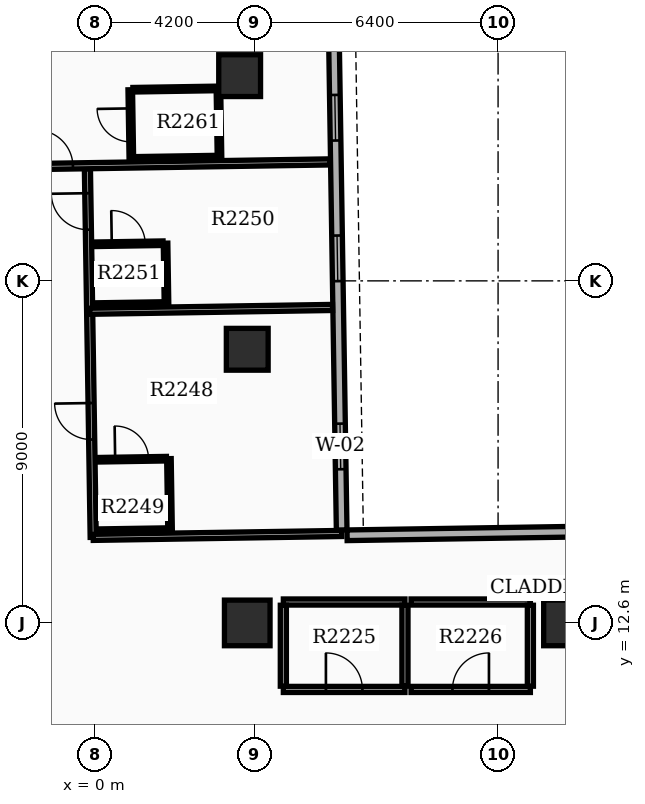
"""IFC4 building model, lengths in metres.
Left out: names, types, materials, properties, quantities, classifications, styles, units other than length and angle.
Written with IfcOpenShell. Run it as: python <this file> out.ifc"""

import sys

from ifc_helpers import new_model, si_unit, direction, frame, frame_2d, origin, origin_2d, place, context, subcontext, project, spatial, rectangle, extrude, element, fill, save


model = new_model("IFC4")
c1 = context("Model", 3, precision=1e-05, world=origin(), true_north=direction((0.0, 1.0)))
c2 = subcontext(c1, "Body", "Model", "MODEL_VIEW")
j1 = project(units=[si_unit("LENGTHUNIT", "METRE"), si_unit("PLANEANGLEUNIT", "RADIAN")], contexts=[c1])
p1 = place(None, origin())
s1 = spatial("IfcSite", under=j1, at=p1, CompositionType="ELEMENT")
p2 = place(p1, origin())
s2 = spatial("IfcBuilding", under=s1, at=p2, CompositionType="ELEMENT")
p3 = place(p2, frame((0.0, 0.0, 139.8)))
s3 = spatial("IfcBuildingStorey", under=s2, at=p3, CompositionType="ELEMENT", Elevation=139.8)
for number, where, z_axis, x_axis in (
    (1, (12.4, 12.6, 0.0), (0.0, 0.0, 1.0), (1.0, 0.0, 0.0)),
    (2, (4.0, 12.6, 0.0), (0.0, 0.0, 1.0), (1.0, 0.0, 0.0)),
):
    element("IfcColumn", number, at=place(p3, frame(where, z_axis=z_axis, x_axis=x_axis)), inside=s3, PredefinedType="COLUMN", context=c2, shape_type="SweptSolid", body=[
        extrude(rectangle(XDim=1.2, YDim=1.2, at=origin_2d()), origin(), (0.0, 0.0, 1.0), 3.9),
    ])
for number, where, z_axis, x_axis in (
    (3, (4.0, 19.8, 0.0), (0.0, 0.0, 1.0), (1.0, 0.0, 0.0)),
    (4, (3.8, 27.0, 0.0), (0.0, 0.0, 1.0), (1.0, 0.0, 0.0)),
):
    element("IfcColumn", number, at=place(p3, frame(where, z_axis=z_axis, x_axis=x_axis)), inside=s3, PredefinedType="COLUMN", context=c2, shape_type="SweptSolid", body=[
        extrude(rectangle(XDim=1.1, YDim=1.1, at=origin_2d()), origin(), (0.0, 0.0, 1.0), 3.9),
    ])
p4 = place(p3, frame((6.485, 15.044, 0.0), z_axis=(0.0, 0.0, 1.0), x_axis=(-0.01571739401, 0.999876474133, 0.0)))
e5 = element("IfcWall", 5, at=p4, inside=s3, PredefinedType="STANDARD", context=c2, shape_type="SweptSolid", body=[
    extrude(rectangle(XDim=20.1, YDim=0.28, at=frame_2d((10.05, 0.0))), origin(), (0.0, 0.0, 1.0), 2.92),
])
p5 = place(p4, frame((1.6, 0.0, 0.8)))
e6 = element("IfcOpeningElement", 6, at=p5, cuts=e5, PredefinedType="OPENING", context=c2, shape_type="SweptSolid", body=[
    extrude(rectangle(XDim=1.2, YDim=1.6, at=frame_2d((0.6, 0.8))), frame((0.0, 0.15, 0.0), z_axis=(0.0, -1.0, 0.0), x_axis=(1.0, 0.0, 0.0)), (0.0, 0.0, 1.0), 0.3),
])
p6 = place(p4, frame((6.55, 0.0, 0.8)))
e7 = element("IfcOpeningElement", 7, at=p6, cuts=e5, PredefinedType="OPENING", context=c2, shape_type="SweptSolid", body=[
    extrude(rectangle(XDim=1.2, YDim=1.6, at=frame_2d((0.6, 0.8))), frame((0.0, 0.15, 0.0), z_axis=(0.0, -1.0, 0.0), x_axis=(1.0, 0.0, 0.0)), (0.0, 0.0, 1.0), 0.3),
])
p7 = place(p4, frame((10.25, 0.0, 0.8)))
e8 = element("IfcOpeningElement", 8, at=p7, cuts=e5, PredefinedType="OPENING", context=c2, shape_type="SweptSolid", body=[
    extrude(rectangle(XDim=1.2, YDim=1.6, at=frame_2d((0.6, 0.8))), frame((0.0, 0.15, 0.0), z_axis=(0.0, -1.0, 0.0), x_axis=(1.0, 0.0, 0.0)), (0.0, 0.0, 1.0), 0.3),
])
p8 = place(p4, frame((13.45, 0.0, 0.8)))
e9 = element("IfcOpeningElement", 9, at=p8, cuts=e5, PredefinedType="OPENING", context=c2, shape_type="SweptSolid", body=[
    extrude(rectangle(XDim=1.2, YDim=1.6, at=frame_2d((0.6, 0.8))), frame((0.0, 0.15, 0.0), z_axis=(0.0, -1.0, 0.0), x_axis=(1.0, 0.0, 0.0)), (0.0, 0.0, 1.0), 0.3),
])
p9 = place(p3, frame((12.926, 15.005, 0.0), z_axis=(0.0, 0.0, 1.0), x_axis=(-0.999876823822, -0.015695132501, 0.0)))
e10 = element("IfcWall", 10, at=p9, inside=s3, PredefinedType="STANDARD", context=c2, shape_type="SweptSolid", body=[
    extrude(rectangle(XDim=6.3, YDim=0.28, at=frame_2d((3.15, 0.0))), origin(), (0.0, 0.0, 1.0), 2.92),
])
p10 = place(p3, frame((4.95, 10.85, 0.0), z_axis=(0.0, 0.0, 1.0), x_axis=(1.0, 0.0, 0.0)))
e11 = element("IfcWall", 11, at=p10, inside=s3, PredefinedType="PARTITIONING", context=c2, shape_type="SweptSolid", body=[
    extrude(rectangle(XDim=3.2, YDim=0.16, at=frame_2d((1.6, 0.0))), origin(), (0.0, 0.0, 1.0), 2.91),
])
p11 = place(p10, frame((1.12, 0.0, 0.0)))
e12 = element("IfcOpeningElement", 12, at=p11, cuts=e11, PredefinedType="OPENING", context=c2, shape_type="SweptSolid", body=[
    extrude(rectangle(XDim=0.96, YDim=2.15, at=frame_2d((0.48, 1.075))), frame((0.0, 0.09, 0.0), z_axis=(0.0, -1.0, 0.0), x_axis=(1.0, 0.0, 0.0)), (0.0, 0.0, 1.0), 0.18),
])
p12 = place(p3, frame((4.95, 13.15, 0.0), z_axis=(0.0, 0.0, 1.0), x_axis=(1.0, 0.0, 0.0)))
e13 = element("IfcWall", 13, at=p12, inside=s3, PredefinedType="PARTITIONING", context=c2, shape_type="SweptSolid", body=[
    extrude(rectangle(XDim=3.2, YDim=0.16, at=frame_2d((1.6, 0.0))), origin(), (0.0, 0.0, 1.0), 2.91),
])
for number, where, z_axis, x_axis in (
    (14, (4.95, 10.935, 0.0), (0.0, 0.0, 1.0), (0.0, 1.0, 0.0)),
    (15, (8.15, 10.935, 0.0), (0.0, 0.0, 1.0), (0.0, 1.0, 0.0)),
):
    element("IfcWall", number, at=place(p3, frame(where, z_axis=z_axis, x_axis=x_axis)), inside=s3, PredefinedType="PARTITIONING", context=c2, shape_type="SweptSolid", body=[
        extrude(rectangle(XDim=2.13, YDim=0.16, at=frame_2d((1.065, 0.0))), origin(), (0.0, 0.0, 1.0), 2.91),
    ])
p13 = place(p3, frame((8.31, 10.85, 0.0), z_axis=(0.0, 0.0, 1.0), x_axis=(1.0, 0.0, 0.0)))
e16 = element("IfcWall", 16, at=p13, inside=s3, PredefinedType="PARTITIONING", context=c2, shape_type="SweptSolid", body=[
    extrude(rectangle(XDim=3.14, YDim=0.16, at=frame_2d((1.57, 0.0))), origin(), (0.0, 0.0, 1.0), 2.91),
])
p14 = place(p13, frame((1.09, 0.0, 0.0)))
e17 = element("IfcOpeningElement", 17, at=p14, cuts=e16, PredefinedType="OPENING", context=c2, shape_type="SweptSolid", body=[
    extrude(rectangle(XDim=0.96, YDim=2.15, at=frame_2d((0.48, 1.075))), frame((0.0, 0.09, 0.0), z_axis=(0.0, -1.0, 0.0), x_axis=(1.0, 0.0, 0.0)), (0.0, 0.0, 1.0), 0.18),
])
p15 = place(p3, frame((8.31, 13.15, 0.0), z_axis=(0.0, 0.0, 1.0), x_axis=(1.0, 0.0, 0.0)))
e18 = element("IfcWall", 18, at=p15, inside=s3, PredefinedType="PARTITIONING", context=c2, shape_type="SweptSolid", body=[
    extrude(rectangle(XDim=3.14, YDim=0.16, at=frame_2d((1.57, 0.0))), origin(), (0.0, 0.0, 1.0), 2.91),
])
p16 = place(p3, frame((11.45, 10.935, 0.0), z_axis=(0.0, 0.0, 1.0), x_axis=(0.0, 1.0, 0.0)))
e19 = element("IfcWall", 19, at=p16, inside=s3, PredefinedType="PARTITIONING", context=c2, shape_type="SweptSolid", body=[
    extrude(rectangle(XDim=2.13, YDim=0.16, at=frame_2d((1.065, 0.0))), origin(), (0.0, 0.0, 1.0), 2.91),
])
p17 = place(p3, frame((-0.053, 14.851, 0.0), z_axis=(0.0, 0.0, 1.0), x_axis=(-0.015705659641, 0.999876658521, 0.0)))
e20 = element("IfcWall", 20, at=p17, inside=s3, PredefinedType="PARTITIONING", context=c2, shape_type="SweptSolid", body=[
    extrude(rectangle(XDim=9.7, YDim=0.16, at=frame_2d((4.85, 0.0))), origin(), (0.0, 0.0, 1.0), 2.91),
])
p18 = place(p17, frame((2.575, 0.0, 0.0)))
e21 = element("IfcOpeningElement", 21, at=p18, cuts=e20, PredefinedType="OPENING", context=c2, shape_type="SweptSolid", body=[
    extrude(rectangle(XDim=0.96, YDim=2.15, at=frame_2d((0.48, 1.075))), frame((0.0, 0.09, 0.0), z_axis=(0.0, -1.0, 0.0), x_axis=(1.0, 0.0, 0.0)), (0.0, 0.0, 1.0), 0.18),
])
p19 = place(p17, frame((8.097, 0.0, 0.0)))
e22 = element("IfcOpeningElement", 22, at=p19, cuts=e20, PredefinedType="OPENING", context=c2, shape_type="SweptSolid", body=[
    extrude(rectangle(XDim=0.96, YDim=2.15, at=frame_2d((0.48, 1.075))), frame((0.0, 0.09, 0.0), z_axis=(0.0, -1.0, 0.0), x_axis=(1.0, 0.0, 0.0)), (0.0, 0.0, 1.0), 0.18),
])
p20 = place(p3, frame((-0.053, 14.851, 0.0), z_axis=(0.0, 0.0, 1.0), x_axis=(0.999877075733, 0.015679076008, 0.0)))
e23 = element("IfcWall", 23, at=p20, inside=s3, PredefinedType="PARTITIONING", context=c2, shape_type="SweptSolid", body=[
    extrude(rectangle(XDim=6.54, YDim=0.16, at=frame_2d((3.27, 0.0))), origin(), (0.0, 0.0, 1.0), 2.91),
])
p21 = place(p3, frame((-0.147, 20.8, 0.0), z_axis=(0.0, 0.0, 1.0), x_axis=(0.999876774542, 0.015698271615, 0.0)))
e24 = element("IfcWall", 24, at=p21, inside=s3, PredefinedType="PARTITIONING", context=c2, shape_type="SweptSolid", body=[
    extrude(rectangle(XDim=6.392, YDim=0.16, at=frame_2d((3.196, 0.0))), origin(), (0.0, 0.0, 1.0), 2.91),
])
p22 = place(p3, frame((0.055, 16.893, 0.0), z_axis=(0.0, 0.0, 1.0), x_axis=(0.999876836305, 0.015694337248, 0.0)))
e25 = element("IfcWall", 25, at=p22, inside=s3, PredefinedType="PARTITIONING", context=c2, shape_type="SweptSolid", body=[
    extrude(rectangle(XDim=1.82, YDim=0.12, at=frame_2d((0.91, 0.0))), origin(), (0.0, 0.0, 1.0), 2.91),
])
p23 = place(p22, frame((0.47, 0.0, 0.0)))
e26 = element("IfcOpeningElement", 26, at=p23, cuts=e25, PredefinedType="OPENING", context=c2, shape_type="SweptSolid", body=[
    extrude(rectangle(XDim=0.88, YDim=2.1, at=frame_2d((0.44, 1.05))), frame((0.0, 0.07, 0.0), z_axis=(0.0, -1.0, 0.0), x_axis=(1.0, 0.0, 0.0)), (0.0, 0.0, 1.0), 0.14),
])
p24 = place(p3, frame((0.084, 15.013, 0.0), z_axis=(0.0, 0.0, 1.0), x_axis=(0.999876836305, 0.015694337248, 0.0)))
e27 = element("IfcWall", 27, at=p24, inside=s3, PredefinedType="PARTITIONING", context=c2, shape_type="SweptSolid", body=[
    extrude(rectangle(XDim=1.82, YDim=0.12, at=frame_2d((0.91, 0.0))), origin(), (0.0, 0.0, 1.0), 2.91),
])
p25 = place(p3, frame((1.969, 15.043, 0.0), z_axis=(0.0, 0.0, 1.0), x_axis=(-0.01571234584, 0.999876553475, 0.0)))
e28 = element("IfcWall", 28, at=p25, inside=s3, PredefinedType="PARTITIONING", context=c2, shape_type="SweptSolid", body=[
    extrude(rectangle(XDim=1.88, YDim=0.12, at=frame_2d((0.94, 0.0))), origin(), (0.0, 0.0, 1.0), 2.91),
])
p26 = place(p3, frame((-0.034, 22.562, 0.0), z_axis=(0.0, 0.0, 1.0), x_axis=(0.999876836305, 0.015694337248, 0.0)))
e29 = element("IfcWall", 29, at=p26, inside=s3, PredefinedType="PARTITIONING", context=c2, shape_type="SweptSolid", body=[
    extrude(rectangle(XDim=1.82, YDim=0.12, at=frame_2d((0.91, 0.0))), origin(), (0.0, 0.0, 1.0), 2.91),
])
p27 = place(p26, frame((0.47, 0.0, 0.0)))
e30 = element("IfcOpeningElement", 30, at=p27, cuts=e29, PredefinedType="OPENING", context=c2, shape_type="SweptSolid", body=[
    extrude(rectangle(XDim=0.88, YDim=2.1, at=frame_2d((0.44, 1.05))), frame((0.0, 0.07, 0.0), z_axis=(0.0, -1.0, 0.0), x_axis=(1.0, 0.0, 0.0)), (0.0, 0.0, 1.0), 0.14),
])
p28 = place(p3, frame((-0.009, 20.962, 0.0), z_axis=(0.0, 0.0, 1.0), x_axis=(0.999876836305, 0.015694337248, 0.0)))
e31 = element("IfcWall", 31, at=p28, inside=s3, PredefinedType="PARTITIONING", context=c2, shape_type="SweptSolid", body=[
    extrude(rectangle(XDim=1.82, YDim=0.12, at=frame_2d((0.91, 0.0))), origin(), (0.0, 0.0, 1.0), 2.91),
])
p29 = place(p3, frame((1.875, 20.992, 0.0), z_axis=(0.0, 0.0, 1.0), x_axis=(-0.015716050513, 0.999876495251, 0.0)))
e32 = element("IfcWall", 32, at=p29, inside=s3, PredefinedType="PARTITIONING", context=c2, shape_type="SweptSolid", body=[
    extrude(rectangle(XDim=1.6, YDim=0.12, at=frame_2d((0.8, 0.0))), origin(), (0.0, 0.0, 1.0), 2.91),
])
p30 = place(p3, frame((-6.958, 24.524, 0.0), z_axis=(0.0, 0.0, 1.0), x_axis=(0.999876528878, 0.015713911007, 0.0)))
e33 = element("IfcWall", 33, at=p30, inside=s3, PredefinedType="PARTITIONING", context=c2, shape_type="SweptSolid", body=[
    extrude(rectangle(XDim=13.144, YDim=0.16, at=frame_2d((6.572, 0.0))), origin(), (0.0, 0.0, 1.0), 2.91),
])
p31 = place(p30, frame((5.412, 0.0, 0.0)))
e34 = element("IfcOpeningElement", 34, at=p31, cuts=e33, PredefinedType="OPENING", context=c2, shape_type="SweptSolid", body=[
    extrude(rectangle(XDim=0.96, YDim=2.15, at=frame_2d((0.48, 1.075))), frame((0.0, 0.09, 0.0), z_axis=(0.0, -1.0, 0.0), x_axis=(1.0, 0.0, 0.0)), (0.0, 0.0, 1.0), 0.18),
])
p32 = place(p3, frame((0.95, 24.808, 0.0), z_axis=(0.0, 0.0, 1.0), x_axis=(-0.015696442504, 0.999876803258, 0.0)))
e35 = element("IfcWall", 35, at=p32, inside=s3, PredefinedType="PARTITIONING", context=c2, shape_type="SweptSolid", body=[
    extrude(rectangle(XDim=1.82, YDim=0.12, at=frame_2d((0.91, 0.0))), origin(), (0.0, 0.0, 1.0), 2.91),
])
p33 = place(p32, frame((0.45, 0.0, 0.0)))
e36 = element("IfcOpeningElement", 36, at=p33, cuts=e35, PredefinedType="OPENING", context=c2, shape_type="SweptSolid", body=[
    extrude(rectangle(XDim=0.88, YDim=2.1, at=frame_2d((0.44, 1.05))), frame((0.0, 0.07, 0.0), z_axis=(0.0, -1.0, 0.0), x_axis=(1.0, 0.0, 0.0)), (0.0, 0.0, 1.0), 0.14),
])
p34 = place(p3, frame((3.27, 24.844, 0.0), z_axis=(0.0, 0.0, 1.0), x_axis=(-0.015694337248, 0.999876836305, 0.0)))
e37 = element("IfcWall", 37, at=p34, inside=s3, PredefinedType="PARTITIONING", context=c2, shape_type="SweptSolid", body=[
    extrude(rectangle(XDim=1.82, YDim=0.12, at=frame_2d((0.91, 0.0))), origin(), (0.0, 0.0, 1.0), 2.91),
])
for number, where, z_axis, x_axis in (
    (38, (1.021, 24.809, 0.0), (0.0, 0.0, 1.0), (1.0, 0.016, 0.0)),
    (39, (0.992, 26.629, 0.0), (0.0, 0.0, 1.0), (1.0, 0.016, 0.0)),
):
    element("IfcWall", number, at=place(p3, frame(where, z_axis=z_axis, x_axis=x_axis)), inside=s3, PredefinedType="PARTITIONING", context=c2, shape_type="SweptSolid", body=[
        extrude(rectangle(XDim=2.18, YDim=0.12, at=frame_2d((1.09, 0.0))), origin(), (0.0, 0.0, 1.0), 2.91),
    ])
p35 = place(p5, origin())
e40 = element("IfcWindow", 40, at=p35, inside=s3, PartitioningType="SINGLE_PANEL", PredefinedType="WINDOW", context=c2, shape_type="SweptSolid", body=[
    extrude(rectangle(XDim=1.2, YDim=1.6, at=frame_2d((0.6, 0.8))), frame((0.0, 0.03, 0.0), z_axis=(0.0, -1.0, 0.0), x_axis=(1.0, 0.0, 0.0)), (0.0, 0.0, 1.0), 0.06),
])
fill(e6, e40)
p36 = place(p6, origin())
e41 = element("IfcWindow", 41, at=p36, inside=s3, PartitioningType="SINGLE_PANEL", PredefinedType="WINDOW", context=c2, shape_type="SweptSolid", body=[
    extrude(rectangle(XDim=1.2, YDim=1.6, at=frame_2d((0.6, 0.8))), frame((0.0, 0.03, 0.0), z_axis=(0.0, -1.0, 0.0), x_axis=(1.0, 0.0, 0.0)), (0.0, 0.0, 1.0), 0.06),
])
fill(e7, e41)
p37 = place(p7, origin())
e42 = element("IfcWindow", 42, at=p37, inside=s3, PartitioningType="SINGLE_PANEL", PredefinedType="WINDOW", context=c2, shape_type="SweptSolid", body=[
    extrude(rectangle(XDim=1.2, YDim=1.6, at=frame_2d((0.6, 0.8))), frame((0.0, 0.03, 0.0), z_axis=(0.0, -1.0, 0.0), x_axis=(1.0, 0.0, 0.0)), (0.0, 0.0, 1.0), 0.06),
])
fill(e8, e42)
p38 = place(p11, origin())
e43 = element("IfcDoor", 43, at=p38, inside=s3, OperationType="SINGLE_SWING_LEFT", PredefinedType="DOOR", context=c2, shape_type="SweptSolid", body=[
    extrude(rectangle(XDim=0.96, YDim=2.15, at=frame_2d((0.48, 1.075))), frame((0.0, 0.025, 0.0), z_axis=(0.0, -1.0, 0.0), x_axis=(1.0, 0.0, 0.0)), (0.0, 0.0, 1.0), 0.05),
])
fill(e12, e43)
p39 = place(p14, origin())
e44 = element("IfcDoor", 44, at=p39, inside=s3, OperationType="SINGLE_SWING_RIGHT", PredefinedType="DOOR", context=c2, shape_type="SweptSolid", body=[
    extrude(rectangle(XDim=0.96, YDim=2.15, at=frame_2d((0.48, 1.075))), frame((0.0, 0.025, 0.0), z_axis=(0.0, -1.0, 0.0), x_axis=(1.0, 0.0, 0.0)), (0.0, 0.0, 1.0), 0.05),
])
fill(e17, e44)
p40 = place(p18, origin())
e45 = element("IfcDoor", 45, at=p40, inside=s3, OperationType="SINGLE_SWING_RIGHT", PredefinedType="DOOR", context=c2, shape_type="SweptSolid", body=[
    extrude(rectangle(XDim=0.96, YDim=2.15, at=frame_2d((0.48, 1.075))), frame((0.0, 0.025, 0.0), z_axis=(0.0, -1.0, 0.0), x_axis=(1.0, 0.0, 0.0)), (0.0, 0.0, 1.0), 0.05),
])
fill(e21, e45)
p41 = place(p23, origin())
e46 = element("IfcDoor", 46, at=p41, inside=s3, OperationType="SINGLE_SWING_LEFT", PredefinedType="DOOR", context=c2, shape_type="SweptSolid", body=[
    extrude(rectangle(XDim=0.88, YDim=2.1, at=frame_2d((0.44, 1.05))), frame((0.0, 0.025, 0.0), z_axis=(0.0, -1.0, 0.0), x_axis=(1.0, 0.0, 0.0)), (0.0, 0.0, 1.0), 0.05),
])
fill(e26, e46)
p42 = place(p19, origin())
e47 = element("IfcDoor", 47, at=p42, inside=s3, OperationType="SINGLE_SWING_RIGHT", PredefinedType="DOOR", context=c2, shape_type="SweptSolid", body=[
    extrude(rectangle(XDim=0.96, YDim=2.15, at=frame_2d((0.48, 1.075))), frame((0.0, 0.025, 0.0), z_axis=(0.0, -1.0, 0.0), x_axis=(1.0, 0.0, 0.0)), (0.0, 0.0, 1.0), 0.05),
])
fill(e22, e47)
p43 = place(p27, origin())
e48 = element("IfcDoor", 48, at=p43, inside=s3, OperationType="SINGLE_SWING_LEFT", PredefinedType="DOOR", context=c2, shape_type="SweptSolid", body=[
    extrude(rectangle(XDim=0.88, YDim=2.1, at=frame_2d((0.44, 1.05))), frame((0.0, 0.025, 0.0), z_axis=(0.0, -1.0, 0.0), x_axis=(1.0, 0.0, 0.0)), (0.0, 0.0, 1.0), 0.05),
])
fill(e30, e48)
p44 = place(p31, origin())
e49 = element("IfcDoor", 49, at=p44, inside=s3, OperationType="SINGLE_SWING_LEFT", PredefinedType="DOOR", context=c2, shape_type="SweptSolid", body=[
    extrude(rectangle(XDim=0.96, YDim=2.15, at=frame_2d((0.48, 1.075))), frame((0.0, 0.025, 0.0), z_axis=(0.0, -1.0, 0.0), x_axis=(1.0, 0.0, 0.0)), (0.0, 0.0, 1.0), 0.05),
])
fill(e34, e49)
p45 = place(p33, origin())
e50 = element("IfcDoor", 50, at=p45, inside=s3, OperationType="SINGLE_SWING_RIGHT", PredefinedType="DOOR", context=c2, shape_type="SweptSolid", body=[
    extrude(rectangle(XDim=0.88, YDim=2.1, at=frame_2d((0.44, 1.05))), frame((0.0, 0.025, 0.0), z_axis=(0.0, -1.0, 0.0), x_axis=(1.0, 0.0, 0.0)), (0.0, 0.0, 1.0), 0.05),
])
fill(e36, e50)
save(model, sys.argv[1])
